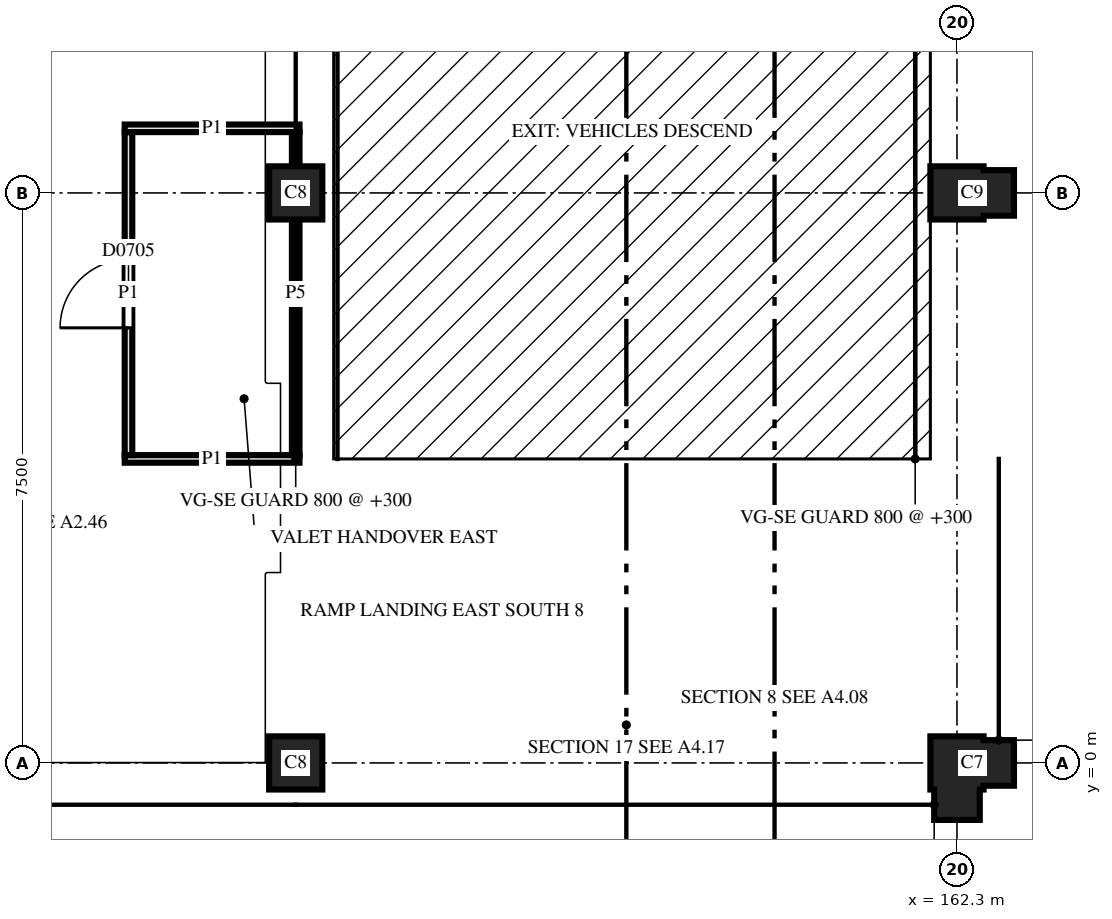
"""IFC4 building model, lengths in metres.
Left out: names, types, materials, properties, quantities, classifications, styles, units other than length and angle.
Written with IfcOpenShell. Run it as: python <this file> out.ifc"""

import sys

from ifc_helpers import new_model, si_unit, direction, frame, frame_2d, origin, place, context, subcontext, project, spatial, polyline, rectangle, outline, extrude, element, fill, save


model = new_model("IFC4")
c1 = context("Model", 3, precision=1e-05, world=origin(), true_north=direction((0.0, 1.0)))
c2 = subcontext(c1, "Body", "Model", "MODEL_VIEW")
j1 = project(units=[si_unit("LENGTHUNIT", "METRE"), si_unit("PLANEANGLEUNIT", "RADIAN")], contexts=[c1])
p1 = place(None, origin())
s1 = spatial("IfcSite", under=j1, at=p1, CompositionType="ELEMENT")
p2 = place(p1, origin())
s2 = spatial("IfcBuilding", under=s1, at=p2, CompositionType="ELEMENT")
p3 = place(p2, frame((0.0, 0.0, 26.7)))
s3 = spatial("IfcBuildingStorey", under=s2, at=p3, CompositionType="ELEMENT", Elevation=26.7)
p4 = place(p3, frame((153.6, 0.0, 0.0), z_axis=(0.0, 0.0, 1.0), x_axis=(1.0, 0.0, 0.0)))
e1 = element("IfcColumn", 1, at=p4, inside=s3, PredefinedType="COLUMN", context=c2, shape_type="SweptSolid", body=[
    extrude(outline(polyline([(-0.35, -0.35), (0.35, -0.35), (0.35, 0.35), (-0.35, 0.35), (-0.35, -0.35)])), origin(), (0.0, 0.0, 1.0), 3.7),
])
p5 = place(p3, frame((162.3, 0.0, 0.0), z_axis=(0.0, 0.0, 1.0), x_axis=(0.0, -1.0, 0.0)))
e2 = element("IfcColumn", 2, at=p5, inside=s3, PredefinedType="COLUMN", context=c2, shape_type="SweptSolid", body=[
    extrude(outline(polyline([(-0.35, -0.35), (0.35, -0.35), (0.35, -0.3), (0.75, -0.3), (0.75, 0.3), (0.35, 0.3), (0.35, 0.35), (0.3, 0.35), (0.3, 0.75), (-0.3, 0.75), (-0.3, 0.35), (-0.35, 0.35), (-0.35, -0.35)])), origin(), (0.0, 0.0, 1.0), 3.7),
])
p6 = place(p3, frame((153.6, 7.5, 0.0), z_axis=(0.0, 0.0, 1.0), x_axis=(1.0, 0.0, 0.0)))
e3 = element("IfcColumn", 3, at=p6, inside=s3, PredefinedType="COLUMN", context=c2, shape_type="SweptSolid", body=[
    extrude(outline(polyline([(-0.35, -0.35), (0.35, -0.35), (0.35, 0.35), (-0.35, 0.35), (-0.35, -0.35)])), origin(), (0.0, 0.0, 1.0), 3.7),
])
p7 = place(p3, frame((162.3, 7.5, 0.0), z_axis=(0.0, 0.0, 1.0), x_axis=(1.0, 0.0, 0.0)))
e4 = element("IfcColumn", 4, at=p7, inside=s3, PredefinedType="COLUMN", context=c2, shape_type="SweptSolid", body=[
    extrude(outline(polyline([(-0.35, -0.35), (0.35, -0.35), (0.35, -0.3), (0.75, -0.3), (0.75, 0.3), (0.35, 0.3), (0.35, 0.35), (-0.35, 0.35), (-0.35, -0.35)])), origin(), (0.0, 0.0, 1.0), 3.7),
])
p8 = place(p3, frame((151.35, 4.0, 0.0), z_axis=(0.0, 0.0, 1.0), x_axis=(1.0, 0.0, 0.0)))
e5 = element("IfcWall", 5, at=p8, inside=s3, PredefinedType="PARTITIONING", context=c2, shape_type="SweptSolid", body=[
    extrude(rectangle(XDim=2.3, YDim=0.1, at=frame_2d((1.15, 0.0))), origin(), (0.0, 0.0, 1.0), 2.88),
])
p9 = place(p3, frame((153.6, 4.05, 0.0), z_axis=(0.0, 0.0, 1.0), x_axis=(0.0, 1.0, 0.0)))
e6 = element("IfcWall", 6, at=p9, inside=s3, PredefinedType="PARTITIONING", context=c2, shape_type="SweptSolid", body=[
    extrude(rectangle(XDim=4.25, YDim=0.1, at=frame_2d((2.125, 0.0))), origin(), (0.0, 0.0, 1.0), 2.6),
])
p10 = place(p3, frame((151.4, 8.3, 0.0), z_axis=(0.0, 0.0, 1.0), x_axis=(0.0, -1.0, 0.0)))
e7 = element("IfcWall", 7, at=p10, inside=s3, PredefinedType="PARTITIONING", context=c2, shape_type="SweptSolid", body=[
    extrude(rectangle(XDim=4.25, YDim=0.1, at=frame_2d((2.125, 0.0))), origin(), (0.0, 0.0, 1.0), 2.88),
])
p11 = place(p10, frame((1.675, 0.0, 0.0)))
e8 = element("IfcOpeningElement", 8, at=p11, cuts=e7, PredefinedType="OPENING", context=c2, shape_type="SweptSolid", body=[
    extrude(rectangle(XDim=0.9, YDim=2.1, at=frame_2d((0.45, 1.05))), frame((0.0, 0.06, 0.0), z_axis=(0.0, -1.0, 0.0), x_axis=(1.0, 0.0, 0.0)), (0.0, 0.0, 1.0), 0.12),
])
p12 = place(p3, frame((153.65, 8.35, 0.0), z_axis=(0.0, 0.0, 1.0), x_axis=(-1.0, 0.0, 0.0)))
e9 = element("IfcWall", 9, at=p12, inside=s3, PredefinedType="PARTITIONING", context=c2, shape_type="SweptSolid", body=[
    extrude(rectangle(XDim=2.3, YDim=0.1, at=frame_2d((1.15, 0.0))), origin(), (0.0, 0.0, 1.0), 2.88),
])
p13 = place(p11, origin())
e10 = element("IfcDoor", 10, at=p13, inside=s3, OperationType="SINGLE_SWING_RIGHT", PredefinedType="DOOR", context=c2, shape_type="SweptSolid", body=[
    extrude(rectangle(XDim=0.9, YDim=2.1, at=frame_2d((0.45, 1.05))), frame((0.0, 0.025, 0.0), z_axis=(0.0, -1.0, 0.0), x_axis=(1.0, 0.0, 0.0)), (0.0, 0.0, 1.0), 0.05),
])
fill(e8, e10)
save(model, sys.argv[1])
